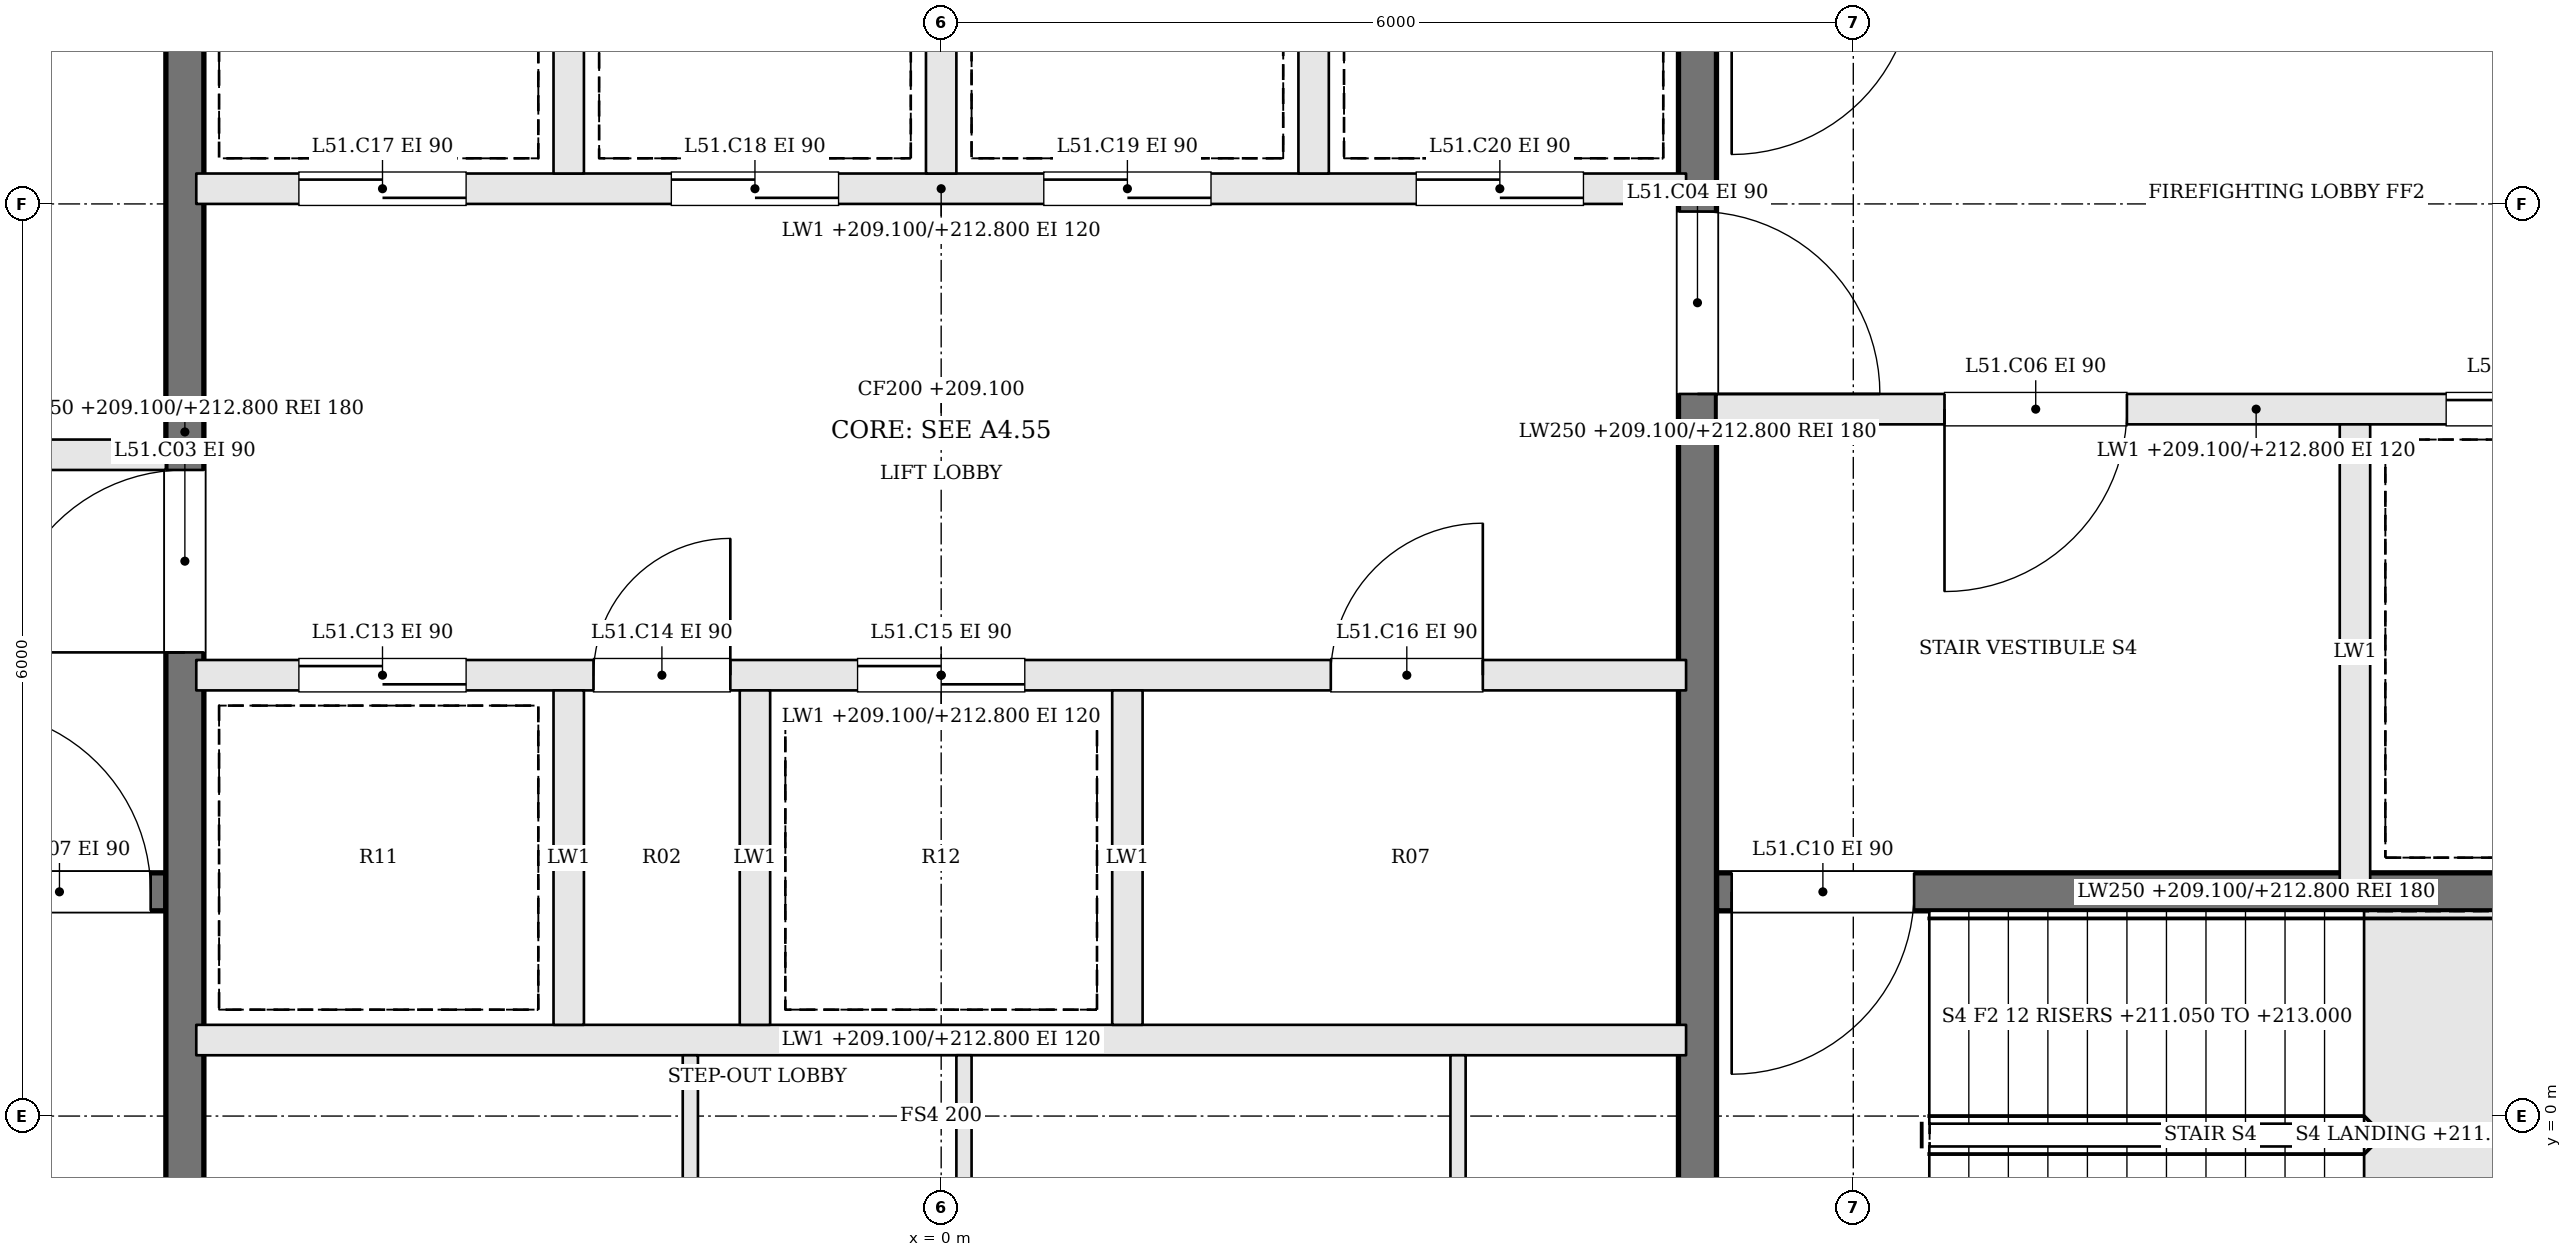
"""IFC4 building model, lengths in metres.
Left out: names, types, materials, properties, quantities, classifications, styles, units other than length and angle.
Written with IfcOpenShell. Run it as: python <this file> out.ifc"""

import sys

from ifc_helpers import new_model, si_unit, direction, frame, frame_2d, origin, place, context, subcontext, project, spatial, rectangle, extrude, element, fill, save


model = new_model("IFC4")
c1 = context("Model", 3, precision=1e-05, world=origin(), true_north=direction((0.0, 1.0)))
c2 = subcontext(c1, "Body", "Model", "MODEL_VIEW")
j1 = project(units=[si_unit("LENGTHUNIT", "METRE"), si_unit("PLANEANGLEUNIT", "RADIAN")], contexts=[c1])
p1 = place(None, origin())
s1 = spatial("IfcSite", under=j1, at=p1, CompositionType="ELEMENT")
p2 = place(p1, origin())
s2 = spatial("IfcBuilding", under=s1, at=p2, CompositionType="ELEMENT")
p3 = place(p2, frame((0.0, 0.0, 209.1)))
s3 = spatial("IfcBuildingStorey", under=s2, at=p3, CompositionType="ELEMENT", Elevation=209.1)
p4 = place(p3, frame((-12.2, 1.475, 0.0), z_axis=(0.0, 0.0, 1.0), x_axis=(1.0, 0.0, 0.0)))
e1 = element("IfcWall", 1, at=p4, inside=s3, PredefinedType="SOLIDWALL", context=c2, shape_type="SweptSolid", body=[
    extrude(rectangle(XDim=7.1, YDim=0.25, at=frame_2d((3.55, 0.0))), origin(), (0.0, 0.0, 1.0), 3.7),
])
p5 = place(p4, frame((5.8, 0.0, 0.0)))
e2 = element("IfcOpeningElement", 2, at=p5, cuts=e1, PredefinedType="OPENING", context=c2, shape_type="SweptSolid", body=[
    extrude(rectangle(XDim=1.2, YDim=2.1, at=frame_2d((0.6, 1.05))), frame((0.0, 0.135, 0.0), z_axis=(0.0, -1.0, 0.0), x_axis=(1.0, 0.0, 0.0)), (0.0, 0.0, 1.0), 0.27),
])
p6 = place(p3, frame((-12.2, 4.35, 0.0), z_axis=(0.0, 0.0, 1.0), x_axis=(1.0, 0.0, 0.0)))
e3 = element("IfcWall", 3, at=p6, inside=s3, PredefinedType="SOLIDWALL", context=c2, shape_type="SweptSolid", body=[
    extrude(rectangle(XDim=7.1, YDim=0.2, at=frame_2d((3.55, 0.0))), origin(), (0.0, 0.0, 1.0), 3.7),
])
p7 = place(p6, frame((4.4, 0.0, 0.0)))
e4 = element("IfcOpeningElement", 4, at=p7, cuts=e3, PredefinedType="OPENING", context=c2, shape_type="SweptSolid", body=[
    extrude(rectangle(XDim=1.2, YDim=2.1, at=frame_2d((0.6, 1.05))), frame((0.0, 0.11, 0.0), z_axis=(0.0, -1.0, 0.0), x_axis=(1.0, 0.0, 0.0)), (0.0, 0.0, 1.0), 0.22),
])
p8 = place(p6, frame((1.1, 0.0, 0.0)))
e5 = element("IfcOpeningElement", 5, at=p8, cuts=e3, PredefinedType="OPENING", context=c2, shape_type="SweptSolid", body=[
    extrude(rectangle(XDim=1.2, YDim=2.1, at=frame_2d((0.6, 1.05))), frame((0.0, 0.11, 0.0), z_axis=(0.0, -1.0, 0.0), x_axis=(1.0, 0.0, 0.0)), (0.0, 0.0, 1.0), 0.22),
])
p9 = place(p3, frame((12.2, 4.65, 0.0), z_axis=(0.0, 0.0, 1.0), x_axis=(-1.0, 0.0, 0.0)))
e6 = element("IfcWall", 6, at=p9, inside=s3, PredefinedType="SOLIDWALL", context=c2, shape_type="SweptSolid", body=[
    extrude(rectangle(XDim=7.1, YDim=0.2, at=frame_2d((3.55, 0.0))), origin(), (0.0, 0.0, 1.0), 3.7),
])
p10 = place(p9, frame((4.4, 0.0, 0.0)))
e7 = element("IfcOpeningElement", 7, at=p10, cuts=e6, PredefinedType="OPENING", context=c2, shape_type="SweptSolid", body=[
    extrude(rectangle(XDim=1.2, YDim=2.1, at=frame_2d((0.6, 1.05))), frame((0.0, 0.11, 0.0), z_axis=(0.0, -1.0, 0.0), x_axis=(1.0, 0.0, 0.0)), (0.0, 0.0, 1.0), 0.22),
])
p11 = place(p9, frame((1.1, 0.0, 0.0)))
e8 = element("IfcOpeningElement", 8, at=p11, cuts=e6, PredefinedType="OPENING", context=c2, shape_type="SweptSolid", body=[
    extrude(rectangle(XDim=1.2, YDim=2.1, at=frame_2d((0.6, 1.05))), frame((0.0, 0.11, 0.0), z_axis=(0.0, -1.0, 0.0), x_axis=(1.0, 0.0, 0.0)), (0.0, 0.0, 1.0), 0.22),
])
p12 = place(p3, frame((12.2, 1.475, 0.0), z_axis=(0.0, 0.0, 1.0), x_axis=(-1.0, 0.0, 0.0)))
e9 = element("IfcWall", 9, at=p12, inside=s3, PredefinedType="SOLIDWALL", context=c2, shape_type="SweptSolid", body=[
    extrude(rectangle(XDim=7.1, YDim=0.25, at=frame_2d((3.55, 0.0))), origin(), (0.0, 0.0, 1.0), 3.7),
])
p13 = place(p12, frame((5.8, 0.0, 0.0)))
e10 = element("IfcOpeningElement", 10, at=p13, cuts=e9, PredefinedType="OPENING", context=c2, shape_type="SweptSolid", body=[
    extrude(rectangle(XDim=1.2, YDim=2.1, at=frame_2d((0.6, 1.05))), frame((0.0, 0.135, 0.0), z_axis=(0.0, -1.0, 0.0), x_axis=(1.0, 0.0, 0.0)), (0.0, 0.0, 1.0), 0.27),
])
p14 = place(p3, frame((9.3, 4.55, 0.0), z_axis=(0.0, 0.0, 1.0), x_axis=(0.0, -1.0, 0.0)))
e11 = element("IfcWall", 11, at=p14, inside=s3, PredefinedType="SOLIDWALL", context=c2, shape_type="SweptSolid", body=[
    extrude(rectangle(XDim=3.0, YDim=0.2, at=frame_2d((1.5, 0.0))), origin(), (0.0, 0.0, 1.0), 3.7),
])
p15 = place(p3, frame((-4.975, -2.2, 0.0), z_axis=(0.0, 0.0, 1.0), x_axis=(0.0, 1.0, 0.0)))
e12 = element("IfcWall", 12, at=p15, inside=s3, PredefinedType="SOLIDWALL", context=c2, shape_type="SweptSolid", body=[
    extrude(rectangle(XDim=13.4, YDim=0.25, at=frame_2d((6.7, 0.0))), origin(), (0.0, 0.0, 1.0), 3.7),
])
p16 = place(p15, frame((5.25, 0.0, 0.0)))
e13 = element("IfcOpeningElement", 13, at=p16, cuts=e12, PredefinedType="OPENING", context=c2, shape_type="SweptSolid", body=[
    extrude(rectangle(XDim=1.2, YDim=2.1, at=frame_2d((0.6, 1.05))), frame((0.0, 0.135, 0.0), z_axis=(0.0, -1.0, 0.0), x_axis=(1.0, 0.0, 0.0)), (0.0, 0.0, 1.0), 0.27),
])
p17 = place(p3, frame((4.975, 11.2, 0.0), z_axis=(0.0, 0.0, 1.0), x_axis=(0.0, -1.0, 0.0)))
e14 = element("IfcWall", 14, at=p17, inside=s3, PredefinedType="SOLIDWALL", context=c2, shape_type="SweptSolid", body=[
    extrude(rectangle(XDim=13.4, YDim=0.25, at=frame_2d((6.7, 0.0))), origin(), (0.0, 0.0, 1.0), 3.7),
])
p18 = place(p17, frame((5.25, 0.0, 0.0)))
e15 = element("IfcOpeningElement", 15, at=p18, cuts=e14, PredefinedType="OPENING", context=c2, shape_type="SweptSolid", body=[
    extrude(rectangle(XDim=1.2, YDim=2.1, at=frame_2d((0.6, 1.05))), frame((0.0, 0.135, 0.0), z_axis=(0.0, -1.0, 0.0), x_axis=(1.0, 0.0, 0.0)), (0.0, 0.0, 1.0), 0.27),
])
p19 = place(p3, frame((-4.9, 0.5, 0.0), z_axis=(0.0, 0.0, 1.0), x_axis=(1.0, 0.0, 0.0)))
e16 = element("IfcWall", 16, at=p19, inside=s3, PredefinedType="SOLIDWALL", context=c2, shape_type="SweptSolid", body=[
    extrude(rectangle(XDim=9.8, YDim=0.2, at=frame_2d((4.9, 0.0))), origin(), (0.0, 0.0, 1.0), 3.7),
])
p20 = place(p3, frame((-4.9, 2.9, 0.0), z_axis=(0.0, 0.0, 1.0), x_axis=(1.0, 0.0, 0.0)))
e17 = element("IfcWall", 17, at=p20, inside=s3, PredefinedType="SOLIDWALL", context=c2, shape_type="SweptSolid", body=[
    extrude(rectangle(XDim=9.8, YDim=0.2, at=frame_2d((4.9, 0.0))), origin(), (0.0, 0.0, 1.0), 3.7),
])
p21 = place(p20, frame((0.675, 0.0, 0.0)))
e18 = element("IfcOpeningElement", 18, at=p21, cuts=e17, PredefinedType="OPENING", context=c2, shape_type="SweptSolid", body=[
    extrude(rectangle(XDim=1.1, YDim=2.1, at=frame_2d((0.55, 1.05))), frame((0.0, 0.11, 0.0), z_axis=(0.0, -1.0, 0.0), x_axis=(1.0, 0.0, 0.0)), (0.0, 0.0, 1.0), 0.22),
])
p22 = place(p20, frame((2.613, 0.0, 0.0)))
e19 = element("IfcOpeningElement", 19, at=p22, cuts=e17, PredefinedType="OPENING", context=c2, shape_type="SweptSolid", body=[
    extrude(rectangle(XDim=0.9, YDim=2.1, at=frame_2d((0.45, 1.05))), frame((0.0, 0.11, 0.0), z_axis=(0.0, -1.0, 0.0), x_axis=(1.0, 0.0, 0.0)), (0.0, 0.0, 1.0), 0.22),
])
p23 = place(p20, frame((4.35, 0.0, 0.0)))
e20 = element("IfcOpeningElement", 20, at=p23, cuts=e17, PredefinedType="OPENING", context=c2, shape_type="SweptSolid", body=[
    extrude(rectangle(XDim=1.1, YDim=2.1, at=frame_2d((0.55, 1.05))), frame((0.0, 0.11, 0.0), z_axis=(0.0, -1.0, 0.0), x_axis=(1.0, 0.0, 0.0)), (0.0, 0.0, 1.0), 0.22),
])
p24 = place(p20, frame((7.463, 0.0, 0.0)))
e21 = element("IfcOpeningElement", 21, at=p24, cuts=e17, PredefinedType="OPENING", context=c2, shape_type="SweptSolid", body=[
    extrude(rectangle(XDim=1.0, YDim=2.1, at=frame_2d((0.5, 1.05))), frame((0.0, 0.11, 0.0), z_axis=(0.0, -1.0, 0.0), x_axis=(1.0, 0.0, 0.0)), (0.0, 0.0, 1.0), 0.22),
])
p25 = place(p3, frame((-4.9, 6.1, 0.0), z_axis=(0.0, 0.0, 1.0), x_axis=(1.0, 0.0, 0.0)))
e22 = element("IfcWall", 22, at=p25, inside=s3, PredefinedType="SOLIDWALL", context=c2, shape_type="SweptSolid", body=[
    extrude(rectangle(XDim=9.8, YDim=0.2, at=frame_2d((4.9, 0.0))), origin(), (0.0, 0.0, 1.0), 3.7),
])
p26 = place(p25, frame((0.675, 0.0, 0.0)))
e23 = element("IfcOpeningElement", 23, at=p26, cuts=e22, PredefinedType="OPENING", context=c2, shape_type="SweptSolid", body=[
    extrude(rectangle(XDim=1.1, YDim=2.1, at=frame_2d((0.55, 1.05))), frame((0.0, 0.11, 0.0), z_axis=(0.0, -1.0, 0.0), x_axis=(1.0, 0.0, 0.0)), (0.0, 0.0, 1.0), 0.22),
])
p27 = place(p25, frame((3.125, 0.0, 0.0)))
e24 = element("IfcOpeningElement", 24, at=p27, cuts=e22, PredefinedType="OPENING", context=c2, shape_type="SweptSolid", body=[
    extrude(rectangle(XDim=1.1, YDim=2.1, at=frame_2d((0.55, 1.05))), frame((0.0, 0.11, 0.0), z_axis=(0.0, -1.0, 0.0), x_axis=(1.0, 0.0, 0.0)), (0.0, 0.0, 1.0), 0.22),
])
p28 = place(p25, frame((5.575, 0.0, 0.0)))
e25 = element("IfcOpeningElement", 25, at=p28, cuts=e22, PredefinedType="OPENING", context=c2, shape_type="SweptSolid", body=[
    extrude(rectangle(XDim=1.1, YDim=2.1, at=frame_2d((0.55, 1.05))), frame((0.0, 0.11, 0.0), z_axis=(0.0, -1.0, 0.0), x_axis=(1.0, 0.0, 0.0)), (0.0, 0.0, 1.0), 0.22),
])
p29 = place(p25, frame((8.025, 0.0, 0.0)))
e26 = element("IfcOpeningElement", 26, at=p29, cuts=e22, PredefinedType="OPENING", context=c2, shape_type="SweptSolid", body=[
    extrude(rectangle(XDim=1.1, YDim=2.1, at=frame_2d((0.55, 1.05))), frame((0.0, 0.11, 0.0), z_axis=(0.0, -1.0, 0.0), x_axis=(1.0, 0.0, 0.0)), (0.0, 0.0, 1.0), 0.22),
])
for number, where, z_axis, x_axis in (
    (27, (-2.45, 0.6, 0.0), (0.0, 0.0, 1.0), (0.0, 1.0, 0.0)),
    (28, (-1.225, 0.6, 0.0), (0.0, 0.0, 1.0), (0.0, 1.0, 0.0)),
    (29, (1.225, 0.6, 0.0), (0.0, 0.0, 1.0), (0.0, 1.0, 0.0)),
    (30, (-2.45, 6.2, 0.0), (0.0, 0.0, 1.0), (0.0, 1.0, 0.0)),
    (31, (0.0, 6.2, 0.0), (0.0, 0.0, 1.0), (0.0, 1.0, 0.0)),
    (32, (2.45, 6.2, 0.0), (0.0, 0.0, 1.0), (0.0, 1.0, 0.0)),
):
    element("IfcWall", number, at=place(p3, frame(where, z_axis=z_axis, x_axis=x_axis)), inside=s3, PredefinedType="SOLIDWALL", context=c2, shape_type="SweptSolid", body=[
        extrude(rectangle(XDim=2.2, YDim=0.2, at=frame_2d((1.1, 0.0))), origin(), (0.0, 0.0, 1.0), 3.7),
    ])
for number, where, z_axis, x_axis in (
    (33, (-1.65, -2.2, 0.0), (0.0, 0.0, 1.0), (0.0, 1.0, 0.0)),
    (34, (0.15, -2.2, 0.0), (0.0, 0.0, 1.0), (0.0, 1.0, 0.0)),
    (35, (3.4, -2.2, 0.0), (0.0, 0.0, 1.0), (0.0, 1.0, 0.0)),
):
    element("IfcWall", number, at=place(p3, frame(where, z_axis=z_axis, x_axis=x_axis)), inside=s3, PredefinedType="PARTITIONING", context=c2, shape_type="SweptSolid", body=[
        extrude(rectangle(XDim=2.6, YDim=0.1, at=frame_2d((1.3, 0.0))), origin(), (0.0, 0.0, 1.0), 3.7),
    ])
p30 = place(p16, origin())
e36 = element("IfcDoor", 36, at=p30, inside=s3, OperationType="SINGLE_SWING_LEFT", PredefinedType="DOOR", context=c2, shape_type="SweptSolid", body=[
    extrude(rectangle(XDim=1.2, YDim=2.1, at=frame_2d((0.6, 1.05))), frame((0.0, 0.025, 0.0), z_axis=(0.0, -1.0, 0.0), x_axis=(1.0, 0.0, 0.0)), (0.0, 0.0, 1.0), 0.05),
])
fill(e13, e36)
p31 = place(p18, origin())
e37 = element("IfcDoor", 37, at=p31, inside=s3, OperationType="SINGLE_SWING_RIGHT", PredefinedType="DOOR", context=c2, shape_type="SweptSolid", body=[
    extrude(rectangle(XDim=1.2, YDim=2.1, at=frame_2d((0.6, 1.05))), frame((0.0, 0.025, 0.0), z_axis=(0.0, -1.0, 0.0), x_axis=(1.0, 0.0, 0.0)), (0.0, 0.0, 1.0), 0.05),
])
fill(e15, e37)
p32 = place(p10, origin())
e38 = element("IfcDoor", 38, at=p32, inside=s3, OperationType="SINGLE_SWING_RIGHT", PredefinedType="DOOR", context=c2, shape_type="SweptSolid", body=[
    extrude(rectangle(XDim=1.2, YDim=2.1, at=frame_2d((0.6, 1.05))), frame((0.0, 0.025, 0.0), z_axis=(0.0, -1.0, 0.0), x_axis=(1.0, 0.0, 0.0)), (0.0, 0.0, 1.0), 0.05),
])
fill(e7, e38)
p33 = place(p5, origin())
e39 = element("IfcDoor", 39, at=p33, inside=s3, OperationType="SINGLE_SWING_LEFT", PredefinedType="DOOR", context=c2, shape_type="SweptSolid", body=[
    extrude(rectangle(XDim=1.2, YDim=2.1, at=frame_2d((0.6, 1.05))), frame((0.0, 0.025, 0.0), z_axis=(0.0, -1.0, 0.0), x_axis=(1.0, 0.0, 0.0)), (0.0, 0.0, 1.0), 0.05),
])
fill(e2, e39)
p34 = place(p13, origin())
e40 = element("IfcDoor", 40, at=p34, inside=s3, OperationType="SINGLE_SWING_RIGHT", PredefinedType="DOOR", context=c2, shape_type="SweptSolid", body=[
    extrude(rectangle(XDim=1.2, YDim=2.1, at=frame_2d((0.6, 1.05))), frame((0.0, 0.025, 0.0), z_axis=(0.0, -1.0, 0.0), x_axis=(1.0, 0.0, 0.0)), (0.0, 0.0, 1.0), 0.05),
])
fill(e10, e40)
p35 = place(p11, origin())
e41 = element("IfcDoor", 41, at=p35, inside=s3, OperationType="SLIDING_TO_RIGHT", PredefinedType="DOOR", context=c2, shape_type="SweptSolid", body=[
    extrude(rectangle(XDim=1.2, YDim=2.1, at=frame_2d((0.6, 1.05))), frame((0.0, 0.025, 0.0), z_axis=(0.0, -1.0, 0.0), x_axis=(1.0, 0.0, 0.0)), (0.0, 0.0, 1.0), 0.05),
])
fill(e8, e41)
p36 = place(p21, origin())
e42 = element("IfcDoor", 42, at=p36, inside=s3, OperationType="SLIDING_TO_RIGHT", PredefinedType="DOOR", context=c2, shape_type="SweptSolid", body=[
    extrude(rectangle(XDim=1.1, YDim=2.1, at=frame_2d((0.55, 1.05))), frame((0.0, 0.025, 0.0), z_axis=(0.0, -1.0, 0.0), x_axis=(1.0, 0.0, 0.0)), (0.0, 0.0, 1.0), 0.05),
])
fill(e18, e42)
p37 = place(p22, origin())
e43 = element("IfcDoor", 43, at=p37, inside=s3, OperationType="SINGLE_SWING_RIGHT", PredefinedType="DOOR", context=c2, shape_type="SweptSolid", body=[
    extrude(rectangle(XDim=0.9, YDim=2.1, at=frame_2d((0.45, 1.05))), frame((0.0, 0.025, 0.0), z_axis=(0.0, -1.0, 0.0), x_axis=(1.0, 0.0, 0.0)), (0.0, 0.0, 1.0), 0.05),
])
fill(e19, e43)
p38 = place(p23, origin())
e44 = element("IfcDoor", 44, at=p38, inside=s3, OperationType="SLIDING_TO_LEFT", PredefinedType="DOOR", context=c2, shape_type="SweptSolid", body=[
    extrude(rectangle(XDim=1.1, YDim=2.1, at=frame_2d((0.55, 1.05))), frame((0.0, 0.025, 0.0), z_axis=(0.0, -1.0, 0.0), x_axis=(1.0, 0.0, 0.0)), (0.0, 0.0, 1.0), 0.05),
])
fill(e20, e44)
p39 = place(p24, origin())
e45 = element("IfcDoor", 45, at=p39, inside=s3, OperationType="SINGLE_SWING_RIGHT", PredefinedType="DOOR", context=c2, shape_type="SweptSolid", body=[
    extrude(rectangle(XDim=1.0, YDim=2.1, at=frame_2d((0.5, 1.05))), frame((0.0, 0.025, 0.0), z_axis=(0.0, -1.0, 0.0), x_axis=(1.0, 0.0, 0.0)), (0.0, 0.0, 1.0), 0.05),
])
fill(e21, e45)
p40 = place(p26, origin())
e46 = element("IfcDoor", 46, at=p40, inside=s3, OperationType="SLIDING_TO_RIGHT", PredefinedType="DOOR", context=c2, shape_type="SweptSolid", body=[
    extrude(rectangle(XDim=1.1, YDim=2.1, at=frame_2d((0.55, 1.05))), frame((0.0, 0.025, 0.0), z_axis=(0.0, -1.0, 0.0), x_axis=(1.0, 0.0, 0.0)), (0.0, 0.0, 1.0), 0.05),
])
fill(e23, e46)
p41 = place(p27, origin())
e47 = element("IfcDoor", 47, at=p41, inside=s3, OperationType="SLIDING_TO_LEFT", PredefinedType="DOOR", context=c2, shape_type="SweptSolid", body=[
    extrude(rectangle(XDim=1.1, YDim=2.1, at=frame_2d((0.55, 1.05))), frame((0.0, 0.025, 0.0), z_axis=(0.0, -1.0, 0.0), x_axis=(1.0, 0.0, 0.0)), (0.0, 0.0, 1.0), 0.05),
])
fill(e24, e47)
p42 = place(p28, origin())
e48 = element("IfcDoor", 48, at=p42, inside=s3, OperationType="SLIDING_TO_RIGHT", PredefinedType="DOOR", context=c2, shape_type="SweptSolid", body=[
    extrude(rectangle(XDim=1.1, YDim=2.1, at=frame_2d((0.55, 1.05))), frame((0.0, 0.025, 0.0), z_axis=(0.0, -1.0, 0.0), x_axis=(1.0, 0.0, 0.0)), (0.0, 0.0, 1.0), 0.05),
])
fill(e25, e48)
p43 = place(p29, origin())
e49 = element("IfcDoor", 49, at=p43, inside=s3, OperationType="SLIDING_TO_LEFT", PredefinedType="DOOR", context=c2, shape_type="SweptSolid", body=[
    extrude(rectangle(XDim=1.1, YDim=2.1, at=frame_2d((0.55, 1.05))), frame((0.0, 0.025, 0.0), z_axis=(0.0, -1.0, 0.0), x_axis=(1.0, 0.0, 0.0)), (0.0, 0.0, 1.0), 0.05),
])
fill(e26, e49)
save(model, sys.argv[1])
